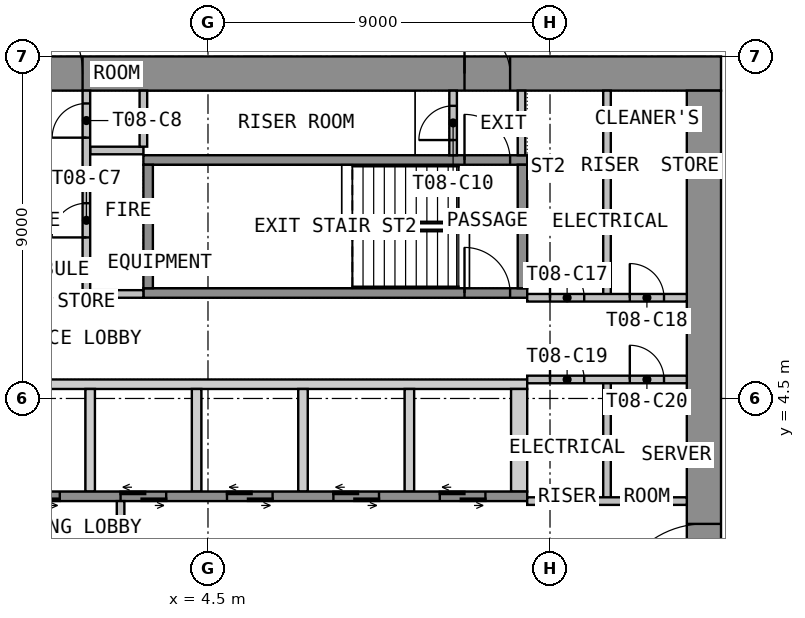
"""IFC4 building model, lengths in metres.
Left out: names, types, materials, properties, quantities, classifications, styles, units other than length and angle.
Written with IfcOpenShell. Run it as: python <this file> out.ifc"""

import sys

from ifc_helpers import new_model, si_unit, direction, frame, frame_2d, origin, place, context, subcontext, project, spatial, polyline, rectangle, outline, extrude, element, fill, save


model = new_model("IFC4")
c1 = context("Model", 3, precision=1e-05, world=origin(), true_north=direction((0.0, 1.0)))
c2 = subcontext(c1, "Body", "Model", "MODEL_VIEW")
j1 = project(units=[si_unit("LENGTHUNIT", "METRE"), si_unit("PLANEANGLEUNIT", "RADIAN")], contexts=[c1])
p1 = place(None, origin())
s1 = spatial("IfcSite", under=j1, at=p1, CompositionType="ELEMENT")
p2 = place(p1, origin())
s2 = spatial("IfcBuilding", under=s1, at=p2, CompositionType="ELEMENT")
p3 = place(p2, frame((0.0, 0.0, 116.4)))
s3 = spatial("IfcBuildingStorey", under=s2, at=p3, CompositionType="ELEMENT", Elevation=116.4)
p4 = place(p3, frame((-18.0, 13.05, 0.0), z_axis=(0.0, 0.0, 1.0), x_axis=(1.0, 0.0, 0.0)))
e1 = element("IfcWall", 1, at=p4, inside=s3, PredefinedType="SHEAR", context=c2, shape_type="SweptSolid", body=[
    extrude(rectangle(XDim=36.0, YDim=0.9, at=frame_2d((18.0, 0.0))), origin(), (0.0, 0.0, 1.0), 3.525),
])
p5 = place(p4, frame((16.8, 0.0, 0.0)))
e2 = element("IfcOpeningElement", 2, at=p5, cuts=e1, PredefinedType="OPENING", context=c2, shape_type="SweptSolid", body=[
    extrude(rectangle(XDim=2.4, YDim=2.1, at=frame_2d((1.2, 1.05))), frame((0.0, 0.46, 0.0), z_axis=(0.0, -1.0, 0.0), x_axis=(1.0, 0.0, 0.0)), (0.0, 0.0, 1.0), 0.92),
])
p6 = place(p4, frame((5.55, 0.0, 0.0)))
e3 = element("IfcOpeningElement", 3, at=p6, cuts=e1, PredefinedType="OPENING", context=c2, shape_type="SweptSolid", body=[
    extrude(rectangle(XDim=1.2, YDim=2.1, at=frame_2d((0.6, 1.05))), frame((0.0, 0.46, 0.0), z_axis=(0.0, -1.0, 0.0), x_axis=(1.0, 0.0, 0.0)), (0.0, 0.0, 1.0), 0.92),
])
p7 = place(p4, frame((29.25, 0.0, 0.0)))
e4 = element("IfcOpeningElement", 4, at=p7, cuts=e1, PredefinedType="OPENING", context=c2, shape_type="SweptSolid", body=[
    extrude(rectangle(XDim=1.2, YDim=2.1, at=frame_2d((0.6, 1.05))), frame((0.0, 0.46, 0.0), z_axis=(0.0, -1.0, 0.0), x_axis=(1.0, 0.0, 0.0)), (0.0, 0.0, 1.0), 0.92),
])
p8 = place(p3, frame((17.55, -12.6, 0.0), z_axis=(0.0, 0.0, 1.0), x_axis=(0.0, 1.0, 0.0)))
e5 = element("IfcWall", 5, at=p8, inside=s3, PredefinedType="SHEAR", context=c2, shape_type="SweptSolid", body=[
    extrude(rectangle(XDim=25.2, YDim=0.9, at=frame_2d((12.6, 0.0))), origin(), (0.0, 0.0, 1.0), 3.525),
])
p9 = place(p8, frame((11.4, 0.0, 0.0)))
e6 = element("IfcOpeningElement", 6, at=p9, cuts=e5, PredefinedType="OPENING", context=c2, shape_type="SweptSolid", body=[
    extrude(rectangle(XDim=2.4, YDim=2.1, at=frame_2d((1.2, 1.05))), frame((0.0, 0.46, 0.0), z_axis=(0.0, -1.0, 0.0), x_axis=(1.0, 0.0, 0.0)), (0.0, 0.0, 1.0), 0.92),
])
p10 = place(p3, origin())
e7 = element("IfcWall", 7, at=p10, inside=s3, PredefinedType="SHEAR", context=c2, shape_type="SweptSolid", body=[
    extrude(outline(polyline([(-12.9, 4.75), (12.9, 4.75), (12.9, 5.0), (-12.9, 5.0), (-12.9, 4.75)])), origin(), (0.0, 0.0, 1.0), 3.525),
])
p11 = place(p3, origin())
e8 = element("IfcWall", 8, at=p11, inside=s3, PredefinedType="SHEAR", context=c2, shape_type="SweptSolid", body=[
    extrude(outline(polyline([(1.275, 2.05), (1.525, 2.05), (1.525, 4.75), (1.275, 4.75), (1.275, 2.05)])), origin(), (0.0, 0.0, 1.0), 3.525),
])
p12 = place(p3, origin())
e9 = element("IfcWall", 9, at=p12, inside=s3, PredefinedType="SHEAR", context=c2, shape_type="SweptSolid", body=[
    extrude(outline(polyline([(4.075, 2.05), (4.325, 2.05), (4.325, 4.75), (4.075, 4.75), (4.075, 2.05)])), origin(), (0.0, 0.0, 1.0), 3.525),
])
p13 = place(p3, origin())
e10 = element("IfcWall", 10, at=p13, inside=s3, PredefinedType="SHEAR", context=c2, shape_type="SweptSolid", body=[
    extrude(outline(polyline([(6.875, 2.05), (7.125, 2.05), (7.125, 4.75), (6.875, 4.75), (6.875, 2.05)])), origin(), (0.0, 0.0, 1.0), 3.525),
])
p14 = place(p3, origin())
e11 = element("IfcWall", 11, at=p14, inside=s3, PredefinedType="SHEAR", context=c2, shape_type="SweptSolid", body=[
    extrude(outline(polyline([(9.675, 2.05), (9.925, 2.05), (9.925, 4.75), (9.675, 4.75), (9.675, 2.05)])), origin(), (0.0, 0.0, 1.0), 3.525),
])
p15 = place(p3, origin())
e12 = element("IfcWall", 12, at=p15, inside=s3, PredefinedType="SHEAR", context=c2, shape_type="SweptSolid", body=[
    extrude(outline(polyline([(12.475, 2.05), (12.9, 2.05), (12.9, 4.75), (12.475, 4.75), (12.475, 2.05)])), origin(), (0.0, 0.0, 1.0), 3.525),
])
p16 = place(p3, frame((-12.9, 1.925, 0.0), z_axis=(0.0, 0.0, 1.0), x_axis=(1.0, 0.0, 0.0)))
e13 = element("IfcWall", 13, at=p16, inside=s3, PredefinedType="SHEAR", context=c2, shape_type="SweptSolid", body=[
    extrude(rectangle(XDim=25.8, YDim=0.25, at=frame_2d((12.9, 0.0))), origin(), (0.0, 0.0, 1.0), 3.525),
])
p17 = place(p16, frame((9.5, 0.0, 0.0)))
e14 = element("IfcOpeningElement", 14, at=p17, cuts=e13, PredefinedType="OPENING", context=c2, shape_type="SweptSolid", body=[
    extrude(rectangle(XDim=1.2, YDim=2.1, at=frame_2d((0.6, 1.05))), frame((0.0, 0.135, 0.0), z_axis=(0.0, -1.0, 0.0), x_axis=(1.0, 0.0, 0.0)), (0.0, 0.0, 1.0), 0.27),
])
p18 = place(p16, frame((12.3, 0.0, 0.0)))
e15 = element("IfcOpeningElement", 15, at=p18, cuts=e13, PredefinedType="OPENING", context=c2, shape_type="SweptSolid", body=[
    extrude(rectangle(XDim=1.2, YDim=2.1, at=frame_2d((0.6, 1.05))), frame((0.0, 0.135, 0.0), z_axis=(0.0, -1.0, 0.0), x_axis=(1.0, 0.0, 0.0)), (0.0, 0.0, 1.0), 0.27),
])
p19 = place(p16, frame((15.1, 0.0, 0.0)))
e16 = element("IfcOpeningElement", 16, at=p19, cuts=e13, PredefinedType="OPENING", context=c2, shape_type="SweptSolid", body=[
    extrude(rectangle(XDim=1.2, YDim=2.1, at=frame_2d((0.6, 1.05))), frame((0.0, 0.135, 0.0), z_axis=(0.0, -1.0, 0.0), x_axis=(1.0, 0.0, 0.0)), (0.0, 0.0, 1.0), 0.27),
])
p20 = place(p16, frame((17.9, 0.0, 0.0)))
e17 = element("IfcOpeningElement", 17, at=p20, cuts=e13, PredefinedType="OPENING", context=c2, shape_type="SweptSolid", body=[
    extrude(rectangle(XDim=1.2, YDim=2.1, at=frame_2d((0.6, 1.05))), frame((0.0, 0.135, 0.0), z_axis=(0.0, -1.0, 0.0), x_axis=(1.0, 0.0, 0.0)), (0.0, 0.0, 1.0), 0.27),
])
p21 = place(p16, frame((20.7, 0.0, 0.0)))
e18 = element("IfcOpeningElement", 18, at=p21, cuts=e13, PredefinedType="OPENING", context=c2, shape_type="SweptSolid", body=[
    extrude(rectangle(XDim=1.2, YDim=2.1, at=frame_2d((0.6, 1.05))), frame((0.0, 0.135, 0.0), z_axis=(0.0, -1.0, 0.0), x_axis=(1.0, 0.0, 0.0)), (0.0, 0.0, 1.0), 0.27),
])
p22 = place(p16, frame((23.5, 0.0, 0.0)))
e19 = element("IfcOpeningElement", 19, at=p22, cuts=e13, PredefinedType="OPENING", context=c2, shape_type="SweptSolid", body=[
    extrude(rectangle(XDim=1.2, YDim=2.1, at=frame_2d((0.6, 1.05))), frame((0.0, 0.135, 0.0), z_axis=(0.0, -1.0, 0.0), x_axis=(1.0, 0.0, 0.0)), (0.0, 0.0, 1.0), 0.27),
])
p23 = place(p3, frame((2.2, -1.8, 0.0), z_axis=(0.0, 0.0, 1.0), x_axis=(0.0, 1.0, 0.0)))
e20 = element("IfcWall", 20, at=p23, inside=s3, PredefinedType="PARTITIONING", context=c2, shape_type="SweptSolid", body=[
    extrude(rectangle(XDim=3.6, YDim=0.2, at=frame_2d((1.8, 0.0))), origin(), (0.0, 0.0, 1.0), 3.525),
])
p24 = place(p23, frame((1.2, 0.0, 0.0)))
e21 = element("IfcOpeningElement", 21, at=p24, cuts=e20, PredefinedType="OPENING", context=c2, shape_type="SweptSolid", body=[
    extrude(rectangle(XDim=1.2, YDim=2.1, at=frame_2d((0.6, 1.05))), frame((0.0, 0.11, 0.0), z_axis=(0.0, -1.0, 0.0), x_axis=(1.0, 0.0, 0.0)), (0.0, 0.0, 1.0), 0.22),
])
p25 = place(p3, frame((2.8, 7.275, 0.0), z_axis=(0.0, 0.0, 1.0), x_axis=(1.0, 0.0, 0.0)))
e22 = element("IfcWall", 22, at=p25, inside=s3, PredefinedType="SHEAR", context=c2, shape_type="SweptSolid", body=[
    extrude(rectangle(XDim=10.1, YDim=0.25, at=frame_2d((5.05, 0.0))), origin(), (0.0, 0.0, 1.0), 3.525),
])
p26 = place(p25, frame((8.45, 0.0, 0.0)))
e23 = element("IfcOpeningElement", 23, at=p26, cuts=e22, PredefinedType="OPENING", context=c2, shape_type="SweptSolid", body=[
    extrude(rectangle(XDim=1.2, YDim=2.1, at=frame_2d((0.6, 1.05))), frame((0.0, 0.135, 0.0), z_axis=(0.0, -1.0, 0.0), x_axis=(1.0, 0.0, 0.0)), (0.0, 0.0, 1.0), 0.27),
])
p27 = place(p3, frame((2.8, 10.775, 0.0), z_axis=(0.0, 0.0, 1.0), x_axis=(1.0, 0.0, 0.0)))
e24 = element("IfcWall", 24, at=p27, inside=s3, PredefinedType="SHEAR", context=c2, shape_type="SweptSolid", body=[
    extrude(rectangle(XDim=10.1, YDim=0.25, at=frame_2d((5.05, 0.0))), origin(), (0.0, 0.0, 1.0), 3.525),
])
p28 = place(p27, frame((8.45, 0.0, 0.0)))
e25 = element("IfcOpeningElement", 25, at=p28, cuts=e24, PredefinedType="OPENING", context=c2, shape_type="SweptSolid", body=[
    extrude(rectangle(XDim=1.2, YDim=2.1, at=frame_2d((0.6, 1.05))), frame((0.0, 0.135, 0.0), z_axis=(0.0, -1.0, 0.0), x_axis=(1.0, 0.0, 0.0)), (0.0, 0.0, 1.0), 0.27),
])
for number, where, z_axis, x_axis in (
    (26, (2.925, 7.4, 0.0), (0.0, 0.0, 1.0), (0.0, 1.0, 0.0)),
    (27, (12.775, 7.4, 0.0), (0.0, 0.0, 1.0), (0.0, 1.0, 0.0)),
):
    element("IfcWall", number, at=place(p3, frame(where, z_axis=z_axis, x_axis=x_axis)), inside=s3, PredefinedType="SHEAR", context=c2, shape_type="SweptSolid", body=[
        extrude(rectangle(XDim=3.25, YDim=0.25, at=frame_2d((1.625, 0.0))), origin(), (0.0, 0.0, 1.0), 3.525),
    ])
for number, where, z_axis, x_axis in (
    (28, (1.4, 7.25, 0.0), (0.0, 0.0, 1.0), (1.0, 0.0, 0.0)),
    (29, (1.4, 11.025, 0.0), (0.0, 0.0, 1.0), (1.0, 0.0, 0.0)),
):
    element("IfcWall", number, at=place(p3, frame(where, z_axis=z_axis, x_axis=x_axis)), inside=s3, PredefinedType="PARTITIONING", context=c2, shape_type="SweptSolid", body=[
        extrude(rectangle(XDim=1.4, YDim=0.2, at=frame_2d((0.7, 0.0))), origin(), (0.0, 0.0, 1.0), 3.525),
    ])
p29 = place(p3, frame((1.3, 7.15, 0.0), z_axis=(0.0, 0.0, 1.0), x_axis=(0.0, 1.0, 0.0)))
e30 = element("IfcWall", 30, at=p29, inside=s3, PredefinedType="PARTITIONING", context=c2, shape_type="SweptSolid", body=[
    extrude(rectangle(XDim=5.45, YDim=0.2, at=frame_2d((2.725, 0.0))), origin(), (0.0, 0.0, 1.0), 3.525),
])
p30 = place(p29, frame((1.587, 0.0, 0.0)))
e31 = element("IfcOpeningElement", 31, at=p30, cuts=e30, PredefinedType="OPENING", context=c2, shape_type="SweptSolid", body=[
    extrude(rectangle(XDim=0.9, YDim=2.1, at=frame_2d((0.45, 1.05))), frame((0.0, 0.11, 0.0), z_axis=(0.0, -1.0, 0.0), x_axis=(1.0, 0.0, 0.0)), (0.0, 0.0, 1.0), 0.22),
])
p31 = place(p29, frame((4.212, 0.0, 0.0)))
e32 = element("IfcOpeningElement", 32, at=p31, cuts=e30, PredefinedType="OPENING", context=c2, shape_type="SweptSolid", body=[
    extrude(rectangle(XDim=0.9, YDim=2.1, at=frame_2d((0.45, 1.05))), frame((0.0, 0.11, 0.0), z_axis=(0.0, -1.0, 0.0), x_axis=(1.0, 0.0, 0.0)), (0.0, 0.0, 1.0), 0.22),
])
p32 = place(p3, frame((12.75, 10.9, 0.0), z_axis=(0.0, 0.0, 1.0), x_axis=(0.0, 1.0, 0.0)))
e33 = element("IfcWall", 33, at=p32, inside=s3, PredefinedType="PARTITIONING", context=c2, shape_type="SweptSolid", body=[
    extrude(rectangle(XDim=1.7, YDim=0.2, at=frame_2d((0.85, 0.0))), origin(), (0.0, 0.0, 1.0), 3.525),
])
p33 = place(p3, frame((10.95, 10.9, 0.0), z_axis=(0.0, 0.0, 1.0), x_axis=(0.0, 1.0, 0.0)))
e34 = element("IfcWall", 34, at=p33, inside=s3, PredefinedType="PARTITIONING", context=c2, shape_type="SweptSolid", body=[
    extrude(rectangle(XDim=1.7, YDim=0.2, at=frame_2d((0.85, 0.0))), origin(), (0.0, 0.0, 1.0), 3.525),
])
p34 = place(p33, frame((0.4, 0.0, 0.0)))
e35 = element("IfcOpeningElement", 35, at=p34, cuts=e34, PredefinedType="OPENING", context=c2, shape_type="SweptSolid", body=[
    extrude(rectangle(XDim=0.9, YDim=2.1, at=frame_2d((0.45, 1.05))), frame((0.0, 0.11, 0.0), z_axis=(0.0, -1.0, 0.0), x_axis=(1.0, 0.0, 0.0)), (0.0, 0.0, 1.0), 0.22),
])
p35 = place(p3, frame((15.0, 7.15, 0.0), z_axis=(0.0, 0.0, 1.0), x_axis=(0.0, 1.0, 0.0)))
e36 = element("IfcWall", 36, at=p35, inside=s3, PredefinedType="PARTITIONING", context=c2, shape_type="SweptSolid", body=[
    extrude(rectangle(XDim=5.45, YDim=0.2, at=frame_2d((2.725, 0.0))), origin(), (0.0, 0.0, 1.0), 3.525),
])
p36 = place(p3, frame((12.9, 7.15, 0.0), z_axis=(0.0, 0.0, 1.0), x_axis=(1.0, 0.0, 0.0)))
e37 = element("IfcWall", 37, at=p36, inside=s3, PredefinedType="PARTITIONING", context=c2, shape_type="SweptSolid", body=[
    extrude(rectangle(XDim=4.2, YDim=0.2, at=frame_2d((2.1, 0.0))), origin(), (0.0, 0.0, 1.0), 3.525),
])
p37 = place(p36, frame((0.6, 0.0, 0.0)))
e38 = element("IfcOpeningElement", 38, at=p37, cuts=e37, PredefinedType="OPENING", context=c2, shape_type="SweptSolid", body=[
    extrude(rectangle(XDim=0.9, YDim=2.1, at=frame_2d((0.45, 1.05))), frame((0.0, 0.11, 0.0), z_axis=(0.0, -1.0, 0.0), x_axis=(1.0, 0.0, 0.0)), (0.0, 0.0, 1.0), 0.22),
])
p38 = place(p36, frame((2.7, 0.0, 0.0)))
e39 = element("IfcOpeningElement", 39, at=p38, cuts=e37, PredefinedType="OPENING", context=c2, shape_type="SweptSolid", body=[
    extrude(rectangle(XDim=0.9, YDim=2.1, at=frame_2d((0.45, 1.05))), frame((0.0, 0.11, 0.0), z_axis=(0.0, -1.0, 0.0), x_axis=(1.0, 0.0, 0.0)), (0.0, 0.0, 1.0), 0.22),
])
p39 = place(p3, frame((15.0, 1.8, 0.0), z_axis=(0.0, 0.0, 1.0), x_axis=(0.0, 1.0, 0.0)))
e40 = element("IfcWall", 40, at=p39, inside=s3, PredefinedType="PARTITIONING", context=c2, shape_type="SweptSolid", body=[
    extrude(rectangle(XDim=3.2, YDim=0.2, at=frame_2d((1.6, 0.0))), origin(), (0.0, 0.0, 1.0), 3.525),
])
p40 = place(p3, frame((12.9, 5.0, 0.0), z_axis=(0.0, 0.0, 1.0), x_axis=(1.0, 0.0, 0.0)))
e41 = element("IfcWall", 41, at=p40, inside=s3, PredefinedType="PARTITIONING", context=c2, shape_type="SweptSolid", body=[
    extrude(rectangle(XDim=4.2, YDim=0.2, at=frame_2d((2.1, 0.0))), origin(), (0.0, 0.0, 1.0), 3.525),
])
p41 = place(p40, frame((0.6, 0.0, 0.0)))
e42 = element("IfcOpeningElement", 42, at=p41, cuts=e41, PredefinedType="OPENING", context=c2, shape_type="SweptSolid", body=[
    extrude(rectangle(XDim=0.9, YDim=2.1, at=frame_2d((0.45, 1.05))), frame((0.0, 0.11, 0.0), z_axis=(0.0, -1.0, 0.0), x_axis=(1.0, 0.0, 0.0)), (0.0, 0.0, 1.0), 0.22),
])
p42 = place(p40, frame((2.7, 0.0, 0.0)))
e43 = element("IfcOpeningElement", 43, at=p42, cuts=e41, PredefinedType="OPENING", context=c2, shape_type="SweptSolid", body=[
    extrude(rectangle(XDim=0.9, YDim=2.1, at=frame_2d((0.45, 1.05))), frame((0.0, 0.11, 0.0), z_axis=(0.0, -1.0, 0.0), x_axis=(1.0, 0.0, 0.0)), (0.0, 0.0, 1.0), 0.22),
])
p43 = place(p3, frame((12.9, 1.8, 0.0), z_axis=(0.0, 0.0, 1.0), x_axis=(1.0, 0.0, 0.0)))
e44 = element("IfcWall", 44, at=p43, inside=s3, PredefinedType="PARTITIONING", context=c2, shape_type="SweptSolid", body=[
    extrude(rectangle(XDim=4.2, YDim=0.2, at=frame_2d((2.1, 0.0))), origin(), (0.0, 0.0, 1.0), 3.525),
])
p44 = place(p3, frame((2.8, 12.599, 0.0), z_axis=(0.0, 0.0, 1.0), x_axis=(0.0, -1.0, 0.0)))
e45 = element("IfcWall", 45, at=p44, inside=s3, PredefinedType="PARTITIONING", context=c2, shape_type="SweptSolid", body=[
    extrude(rectangle(XDim=1.473, YDim=0.2, at=frame_2d((0.737, 0.0))), origin(), (0.0, 0.0, 1.0), 3.525),
])
p45 = place(p9, origin())
e46 = element("IfcDoor", 46, at=p45, inside=s3, OperationType="DOUBLE_DOOR_DOUBLE_SWING", PredefinedType="DOOR", context=c2, shape_type="SweptSolid", body=[
    extrude(rectangle(XDim=2.4, YDim=2.1, at=frame_2d((1.2, 1.05))), frame((0.0, 0.025, 0.0), z_axis=(0.0, -1.0, 0.0), x_axis=(1.0, 0.0, 0.0)), (0.0, 0.0, 1.0), 0.05),
])
fill(e6, e46)
p46 = place(p5, origin())
e47 = element("IfcDoor", 47, at=p46, inside=s3, OperationType="DOUBLE_DOOR_DOUBLE_SWING", PredefinedType="DOOR", context=c2, shape_type="SweptSolid", body=[
    extrude(rectangle(XDim=2.4, YDim=2.1, at=frame_2d((1.2, 1.05))), frame((0.0, 0.025, 0.0), z_axis=(0.0, -1.0, 0.0), x_axis=(1.0, 0.0, 0.0)), (0.0, 0.0, 1.0), 0.05),
])
fill(e2, e47)
p47 = place(p7, origin())
e48 = element("IfcDoor", 48, at=p47, inside=s3, OperationType="SINGLE_SWING_RIGHT", PredefinedType="DOOR", context=c2, shape_type="SweptSolid", body=[
    extrude(rectangle(XDim=1.2, YDim=2.1, at=frame_2d((0.6, 1.05))), frame((0.0, 0.025, 0.0), z_axis=(0.0, -1.0, 0.0), x_axis=(1.0, 0.0, 0.0)), (0.0, 0.0, 1.0), 0.05),
])
fill(e4, e48)
p48 = place(p18, origin())
e49 = element("IfcDoor", 49, at=p48, inside=s3, OperationType="DOUBLE_DOOR_SLIDING", PredefinedType="DOOR", context=c2, shape_type="SweptSolid", body=[
    extrude(rectangle(XDim=1.2, YDim=2.1, at=frame_2d((0.6, 1.05))), frame((0.0, 0.025, 0.0), z_axis=(0.0, -1.0, 0.0), x_axis=(1.0, 0.0, 0.0)), (0.0, 0.0, 1.0), 0.05),
])
fill(e15, e49)
p49 = place(p19, origin())
e50 = element("IfcDoor", 50, at=p49, inside=s3, OperationType="DOUBLE_DOOR_SLIDING", PredefinedType="DOOR", context=c2, shape_type="SweptSolid", body=[
    extrude(rectangle(XDim=1.2, YDim=2.1, at=frame_2d((0.6, 1.05))), frame((0.0, 0.025, 0.0), z_axis=(0.0, -1.0, 0.0), x_axis=(1.0, 0.0, 0.0)), (0.0, 0.0, 1.0), 0.05),
])
fill(e16, e50)
p50 = place(p20, origin())
e51 = element("IfcDoor", 51, at=p50, inside=s3, OperationType="DOUBLE_DOOR_SLIDING", PredefinedType="DOOR", context=c2, shape_type="SweptSolid", body=[
    extrude(rectangle(XDim=1.2, YDim=2.1, at=frame_2d((0.6, 1.05))), frame((0.0, 0.025, 0.0), z_axis=(0.0, -1.0, 0.0), x_axis=(1.0, 0.0, 0.0)), (0.0, 0.0, 1.0), 0.05),
])
fill(e17, e51)
p51 = place(p21, origin())
e52 = element("IfcDoor", 52, at=p51, inside=s3, OperationType="DOUBLE_DOOR_SLIDING", PredefinedType="DOOR", context=c2, shape_type="SweptSolid", body=[
    extrude(rectangle(XDim=1.2, YDim=2.1, at=frame_2d((0.6, 1.05))), frame((0.0, 0.025, 0.0), z_axis=(0.0, -1.0, 0.0), x_axis=(1.0, 0.0, 0.0)), (0.0, 0.0, 1.0), 0.05),
])
fill(e18, e52)
p52 = place(p22, origin())
e53 = element("IfcDoor", 53, at=p52, inside=s3, OperationType="DOUBLE_DOOR_SLIDING", PredefinedType="DOOR", context=c2, shape_type="SweptSolid", body=[
    extrude(rectangle(XDim=1.2, YDim=2.1, at=frame_2d((0.6, 1.05))), frame((0.0, 0.025, 0.0), z_axis=(0.0, -1.0, 0.0), x_axis=(1.0, 0.0, 0.0)), (0.0, 0.0, 1.0), 0.05),
])
fill(e19, e53)
p53 = place(p26, origin())
e54 = element("IfcDoor", 54, at=p53, inside=s3, OperationType="SINGLE_SWING_LEFT", PredefinedType="DOOR", context=c2, shape_type="SweptSolid", body=[
    extrude(rectangle(XDim=1.2, YDim=2.1, at=frame_2d((0.6, 1.05))), frame((0.0, 0.025, 0.0), z_axis=(0.0, -1.0, 0.0), x_axis=(1.0, 0.0, 0.0)), (0.0, 0.0, 1.0), 0.05),
])
fill(e23, e54)
p54 = place(p30, origin())
e55 = element("IfcDoor", 55, at=p54, inside=s3, OperationType="SINGLE_SWING_LEFT", PredefinedType="DOOR", context=c2, shape_type="SweptSolid", body=[
    extrude(rectangle(XDim=0.9, YDim=2.1, at=frame_2d((0.45, 1.05))), frame((0.0, 0.025, 0.0), z_axis=(0.0, -1.0, 0.0), x_axis=(1.0, 0.0, 0.0)), (0.0, 0.0, 1.0), 0.05),
])
fill(e31, e55)
p55 = place(p31, origin())
e56 = element("IfcDoor", 56, at=p55, inside=s3, OperationType="SINGLE_SWING_LEFT", PredefinedType="DOOR", context=c2, shape_type="SweptSolid", body=[
    extrude(rectangle(XDim=0.9, YDim=2.1, at=frame_2d((0.45, 1.05))), frame((0.0, 0.025, 0.0), z_axis=(0.0, -1.0, 0.0), x_axis=(1.0, 0.0, 0.0)), (0.0, 0.0, 1.0), 0.05),
])
fill(e32, e56)
p56 = place(p28, origin())
e57 = element("IfcDoor", 57, at=p56, inside=s3, OperationType="SINGLE_SWING_RIGHT", PredefinedType="DOOR", context=c2, shape_type="SweptSolid", body=[
    extrude(rectangle(XDim=1.2, YDim=2.1, at=frame_2d((0.6, 1.05))), frame((0.0, 0.025, 0.0), z_axis=(0.0, -1.0, 0.0), x_axis=(1.0, 0.0, 0.0)), (0.0, 0.0, 1.0), 0.05),
])
fill(e25, e57)
p57 = place(p34, origin())
e58 = element("IfcDoor", 58, at=p57, inside=s3, OperationType="SINGLE_SWING_LEFT", PredefinedType="DOOR", context=c2, shape_type="SweptSolid", body=[
    extrude(rectangle(XDim=0.9, YDim=2.1, at=frame_2d((0.45, 1.05))), frame((0.0, 0.025, 0.0), z_axis=(0.0, -1.0, 0.0), x_axis=(1.0, 0.0, 0.0)), (0.0, 0.0, 1.0), 0.05),
])
fill(e35, e58)
p58 = place(p37, origin())
e59 = element("IfcDoor", 59, at=p58, inside=s3, OperationType="SINGLE_SWING_LEFT", PredefinedType="DOOR", context=c2, shape_type="SweptSolid", body=[
    extrude(rectangle(XDim=0.9, YDim=2.1, at=frame_2d((0.45, 1.05))), frame((0.0, 0.025, 0.0), z_axis=(0.0, -1.0, 0.0), x_axis=(1.0, 0.0, 0.0)), (0.0, 0.0, 1.0), 0.05),
])
fill(e38, e59)
p59 = place(p38, origin())
e60 = element("IfcDoor", 60, at=p59, inside=s3, OperationType="SINGLE_SWING_LEFT", PredefinedType="DOOR", context=c2, shape_type="SweptSolid", body=[
    extrude(rectangle(XDim=0.9, YDim=2.1, at=frame_2d((0.45, 1.05))), frame((0.0, 0.025, 0.0), z_axis=(0.0, -1.0, 0.0), x_axis=(1.0, 0.0, 0.0)), (0.0, 0.0, 1.0), 0.05),
])
fill(e39, e60)
p60 = place(p41, origin())
e61 = element("IfcDoor", 61, at=p60, inside=s3, OperationType="SINGLE_SWING_LEFT", PredefinedType="DOOR", context=c2, shape_type="SweptSolid", body=[
    extrude(rectangle(XDim=0.9, YDim=2.1, at=frame_2d((0.45, 1.05))), frame((0.0, 0.025, 0.0), z_axis=(0.0, -1.0, 0.0), x_axis=(1.0, 0.0, 0.0)), (0.0, 0.0, 1.0), 0.05),
])
fill(e42, e61)
p61 = place(p42, origin())
e62 = element("IfcDoor", 62, at=p61, inside=s3, OperationType="SINGLE_SWING_LEFT", PredefinedType="DOOR", context=c2, shape_type="SweptSolid", body=[
    extrude(rectangle(XDim=0.9, YDim=2.1, at=frame_2d((0.45, 1.05))), frame((0.0, 0.025, 0.0), z_axis=(0.0, -1.0, 0.0), x_axis=(1.0, 0.0, 0.0)), (0.0, 0.0, 1.0), 0.05),
])
fill(e43, e62)
save(model, sys.argv[1])
